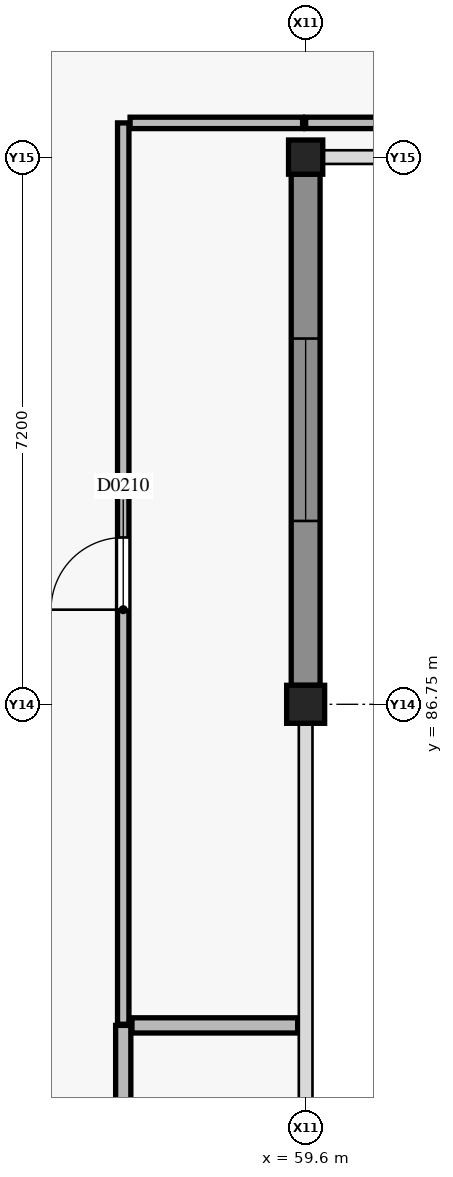
"""IFC4 building model, lengths in metres.
Left out: names, types, materials, properties, quantities, classifications, styles, units other than length and angle.
Written with IfcOpenShell. Run it as: python <this file> out.ifc"""

import sys

from ifc_helpers import new_model, si_unit, direction, frame, frame_2d, origin, origin_2d, place, context, subcontext, project, spatial, rectangle, extrude, element, fill, save


model = new_model("IFC4")
c1 = context("Model", 3, precision=1e-05, world=origin(), true_north=direction((0.0, 1.0)))
c2 = subcontext(c1, "Body", "Model", "MODEL_VIEW")
j1 = project(units=[si_unit("LENGTHUNIT", "METRE"), si_unit("PLANEANGLEUNIT", "RADIAN")], contexts=[c1])
p1 = place(None, origin())
s1 = spatial("IfcSite", under=j1, at=p1, CompositionType="ELEMENT")
p2 = place(p1, origin())
s2 = spatial("IfcBuilding", under=s1, at=p2, CompositionType="ELEMENT")
p3 = place(p2, frame((0.0, 0.0, 4.8)))
s3 = spatial("IfcBuildingStorey", under=s2, at=p3, CompositionType="ELEMENT", Elevation=4.8)
p4 = place(p3, frame((59.6, 86.75, 0.0), z_axis=(0.0, 0.0, 1.0), x_axis=(1.0, 0.0, 0.0)))
e1 = element("IfcColumn", 1, at=p4, inside=s3, PredefinedType="COLUMN", context=c2, shape_type="SweptSolid", body=[
    extrude(rectangle(XDim=0.5, YDim=0.5, at=origin_2d()), origin(), (0.0, 0.0, 1.0), 4.2),
])
p5 = place(p3, frame((59.6, 93.95, 0.0), z_axis=(0.0, 0.0, 1.0), x_axis=(1.0, 0.0, 0.0)))
e2 = element("IfcColumn", 2, at=p5, inside=s3, PredefinedType="COLUMN", context=c2, shape_type="SweptSolid", body=[
    extrude(rectangle(XDim=0.45, YDim=0.45, at=origin_2d()), origin(), (0.0, 0.0, 1.0), 4.2),
])
p6 = place(p3, frame((59.6, 93.725, 0.0), z_axis=(0.0, 0.0, 1.0), x_axis=(0.0, -1.0, 0.0)))
e3 = element("IfcWall", 3, at=p6, inside=s3, PredefinedType="USERDEFINED", context=c2, shape_type="SweptSolid", body=[
    extrude(rectangle(XDim=6.725, YDim=0.38, at=frame_2d((3.363, 0.0))), origin(), (0.0, 0.0, 1.0), 3.13),
])
p7 = place(p6, frame((2.163, 0.0, 0.9)))
e4 = element("IfcOpeningElement", 4, at=p7, cuts=e3, PredefinedType="OPENING", context=c2, shape_type="SweptSolid", body=[
    extrude(rectangle(XDim=2.4, YDim=1.5, at=frame_2d((1.2, 0.75))), frame((0.0, 0.2, 0.0), z_axis=(0.0, -1.0, 0.0), x_axis=(1.0, 0.0, 0.0)), (0.0, 0.0, 1.0), 0.4),
])
p8 = place(p3, frame((57.2, 70.065, 0.0), z_axis=(0.0, 0.0, 1.0), x_axis=(0.0, 1.0, 0.0)))
e5 = element("IfcWall", 5, at=p8, inside=s3, PredefinedType="PARTITIONING", context=c2, shape_type="SweptSolid", body=[
    extrude(rectangle(XDim=12.46, YDim=0.2, at=frame_2d((6.23, 0.0))), origin(), (0.0, 0.0, 1.0), 3.355),
])
p9 = place(p8, frame((5.33, 0.0, 0.0)))
e6 = element("IfcOpeningElement", 6, at=p9, cuts=e5, PredefinedType="OPENING", context=c2, shape_type="SweptSolid", body=[
    extrude(rectangle(XDim=1.8, YDim=2.2, at=frame_2d((0.9, 1.1))), frame((0.0, 0.11, 0.0), z_axis=(0.0, -1.0, 0.0), x_axis=(1.0, 0.0, 0.0)), (0.0, 0.0, 1.0), 0.22),
])
p10 = place(p3, frame((57.2, 82.54, 0.0), z_axis=(0.0, 0.0, 1.0), x_axis=(0.0, 1.0, 0.0)))
e7 = element("IfcWall", 7, at=p10, inside=s3, PredefinedType="PARTITIONING", context=c2, shape_type="SweptSolid", body=[
    extrude(rectangle(XDim=11.86, YDim=0.15, at=frame_2d((5.93, 0.0))), origin(), (0.0, 0.0, 1.0), 3.285),
])
p11 = place(p10, frame((5.455, 0.0, 0.0)))
e8 = element("IfcOpeningElement", 8, at=p11, cuts=e7, PredefinedType="OPENING", context=c2, shape_type="SweptSolid", body=[
    extrude(rectangle(XDim=0.95, YDim=2.1, at=frame_2d((0.475, 1.05))), frame((0.0, 0.085, 0.0), z_axis=(0.0, -1.0, 0.0), x_axis=(1.0, 0.0, 0.0)), (0.0, 0.0, 1.0), 0.17),
])
p12 = place(p3, frame((57.29, 94.4, 0.0), z_axis=(0.0, 0.0, 1.0), x_axis=(1.0, 0.0, 0.0)))
e9 = element("IfcWall", 9, at=p12, inside=s3, PredefinedType="PARTITIONING", context=c2, shape_type="SweptSolid", body=[
    extrude(rectangle(XDim=2.27, YDim=0.15, at=frame_2d((1.135, 0.0))), origin(), (0.0, 0.0, 1.0), 3.285),
])
p13 = place(p3, frame((59.6, 94.4, 0.0), z_axis=(0.0, 0.0, 1.0), x_axis=(1.0, 0.0, 0.0)))
e10 = element("IfcWall", 10, at=p13, inside=s3, PredefinedType="PARTITIONING", context=c2, shape_type="SweptSolid", body=[
    extrude(rectangle(XDim=6.81, YDim=0.15, at=frame_2d((3.405, 0.0))), origin(), (0.0, 0.0, 1.0), 3.285),
])
p14 = place(p3, frame((57.315, 82.525, 0.0), z_axis=(0.0, 0.0, 1.0), x_axis=(1.0, 0.0, 0.0)))
e11 = element("IfcWall", 11, at=p14, inside=s3, PredefinedType="PARTITIONING", context=c2, shape_type="SweptSolid", body=[
    extrude(rectangle(XDim=2.18, YDim=0.2, at=frame_2d((1.09, 0.0))), origin(), (0.0, 0.0, 1.0), 3.215),
])
p15 = place(p7, origin())
e12 = element("IfcWindow", 12, at=p15, inside=s3, PartitioningType="SINGLE_PANEL", PredefinedType="WINDOW", context=c2, shape_type="SweptSolid", body=[
    extrude(rectangle(XDim=2.4, YDim=1.5, at=frame_2d((1.2, 0.75))), frame((0.0, 0.03, 0.0), z_axis=(0.0, -1.0, 0.0), x_axis=(1.0, 0.0, 0.0)), (0.0, 0.0, 1.0), 0.06),
])
fill(e4, e12)
p16 = place(p11, origin())
e13 = element("IfcDoor", 13, at=p16, inside=s3, OperationType="SINGLE_SWING_LEFT", PredefinedType="DOOR", context=c2, shape_type="SweptSolid", body=[
    extrude(rectangle(XDim=0.95, YDim=2.1, at=frame_2d((0.475, 1.05))), frame((0.0, 0.025, 0.0), z_axis=(0.0, -1.0, 0.0), x_axis=(1.0, 0.0, 0.0)), (0.0, 0.0, 1.0), 0.05),
])
fill(e8, e13)
save(model, sys.argv[1])
